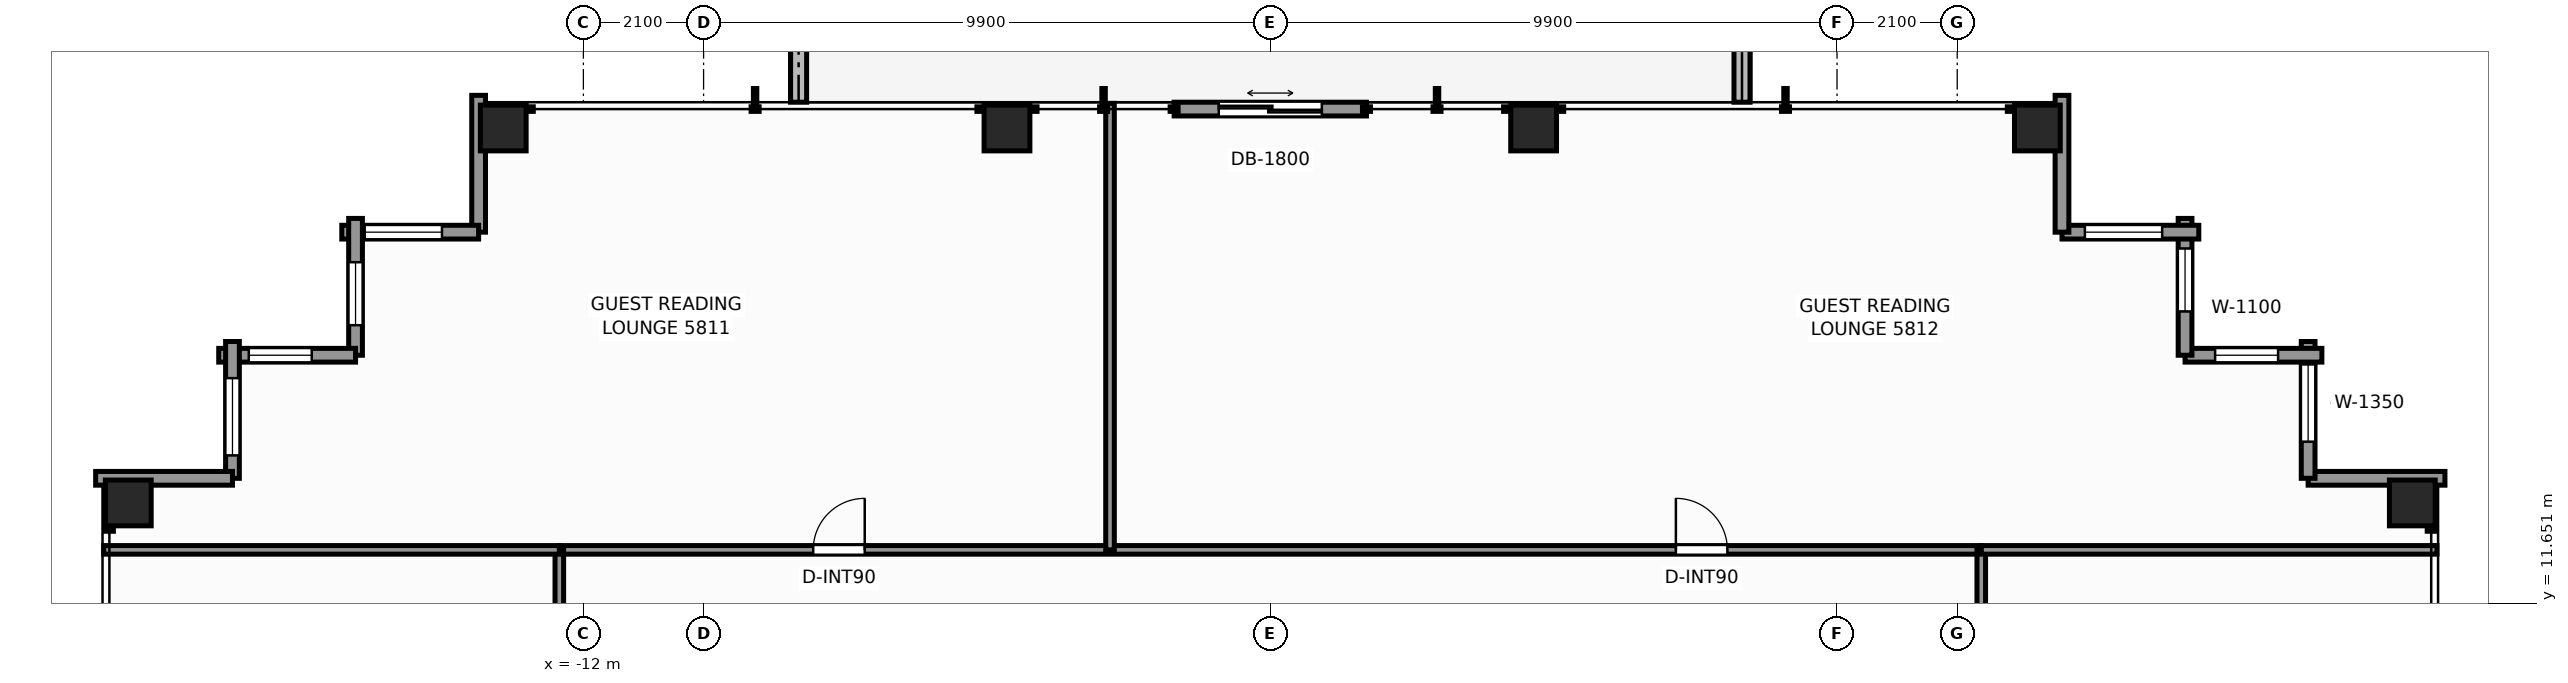
"""IFC4 building model, lengths in metres.
Left out: names, types, materials, properties, quantities, classifications, styles, units other than length and angle.
Written with IfcOpenShell. Run it as: python <this file> out.ifc"""

import sys

from ifc_helpers import new_model, si_unit, direction, frame, frame_2d, origin, origin_2d, place, context, subcontext, project, spatial, rectangle, extrude, element, fill, save


model = new_model("IFC4")
c1 = context("Model", 3, precision=1e-05, world=origin(), true_north=direction((0.0, 1.0)))
c2 = subcontext(c1, "Body", "Model", "MODEL_VIEW")
j1 = project(units=[si_unit("LENGTHUNIT", "METRE"), si_unit("PLANEANGLEUNIT", "RADIAN")], contexts=[c1])
p1 = place(None, origin())
s1 = spatial("IfcSite", under=j1, at=p1, CompositionType="ELEMENT")
p2 = place(p1, origin())
s2 = spatial("IfcBuilding", under=s1, at=p2, CompositionType="ELEMENT")
p3 = place(p2, frame((0.0, 0.0, 199.8)))
s3 = spatial("IfcBuildingStorey", under=s2, at=p3, CompositionType="ELEMENT", Elevation=199.8)
for number, where, z_axis, x_axis in (
    (1, (-13.4, 19.95, 0.0), (0.0, 0.0, 1.0), (1.0, 0.0, 0.0)),
    (2, (-4.6, 19.95, 0.0), (0.0, 0.0, 1.0), (1.0, 0.0, 0.0)),
    (3, (4.6, 19.95, 0.0), (0.0, 0.0, 1.0), (1.0, 0.0, 0.0)),
    (4, (13.4, 19.95, 0.0), (0.0, 0.0, 1.0), (1.0, 0.0, 0.0)),
    (5, (-19.95, 13.4, 0.0), (0.0, 0.0, 1.0), (1.0, 0.0, 0.0)),
    (6, (19.95, 13.4, 0.0), (0.0, 0.0, 1.0), (1.0, 0.0, 0.0)),
):
    element("IfcColumn", number, at=place(p3, frame(where, z_axis=z_axis, x_axis=x_axis)), inside=s3, PredefinedType="COLUMN", context=c2, shape_type="SweptSolid", body=[
        extrude(rectangle(XDim=0.8, YDim=0.8, at=origin_2d()), origin(), (0.0, 0.0, 1.0), 3.3),
    ])
p4 = place(p3, frame((8.24, 20.4, -0.04), z_axis=(0.0, 0.0, 1.0), x_axis=(0.0, 1.0, 0.0)))
e7 = element("IfcWall", 7, at=p4, inside=s3, PredefinedType="PARAPET", context=c2, shape_type="SweptSolid", body=[
    extrude(rectangle(XDim=2.34, YDim=0.28, at=frame_2d((1.17, 0.0))), origin(), (0.0, 0.0, 1.0), 0.42),
])
p5 = place(p3, frame((-8.24, 23.767, -0.04), z_axis=(0.0, 0.0, 1.0), x_axis=(0.0, -1.0, 0.0)))
e8 = element("IfcWall", 8, at=p5, inside=s3, PredefinedType="PARAPET", context=c2, shape_type="SweptSolid", body=[
    extrude(rectangle(XDim=3.367, YDim=0.28, at=frame_2d((1.684, 0.0))), origin(), (0.0, 0.0, 1.0), 0.42),
])
p6 = place(p3, frame((18.13, 13.83, 0.0), z_axis=(0.0, 0.0, 1.0), x_axis=(1.0, 0.0, 0.0)))
e9 = element("IfcWall", 9, at=p6, inside=s3, PredefinedType="STANDARD", context=c2, shape_type="SweptSolid", body=[
    extrude(rectangle(XDim=2.39, YDim=0.24, at=frame_2d((1.195, 0.0))), origin(), (0.0, 0.0, 1.0), 2.463),
])
p7 = place(p3, frame((18.13, 16.22, 0.0), z_axis=(0.0, 0.0, 1.0), x_axis=(0.0, -1.0, 0.0)))
e10 = element("IfcWall", 10, at=p7, inside=s3, PredefinedType="STANDARD", context=c2, shape_type="SweptSolid", body=[
    extrude(rectangle(XDim=2.39, YDim=0.24, at=frame_2d((1.195, 0.0))), origin(), (0.0, 0.0, 1.0), 2.463),
])
p8 = place(p7, frame((0.4, 0.0, 0.65)))
e11 = element("IfcOpeningElement", 11, at=p8, cuts=e10, PredefinedType="OPENING", context=c2, shape_type="SweptSolid", body=[
    extrude(rectangle(XDim=1.35, YDim=1.55, at=frame_2d((0.675, 0.775))), frame((0.0, 0.13, 0.0), z_axis=(0.0, -1.0, 0.0), x_axis=(1.0, 0.0, 0.0)), (0.0, 0.0, 1.0), 0.26),
])
p9 = place(p3, frame((15.98, 15.98, 0.0), z_axis=(0.0, 0.0, 1.0), x_axis=(1.0, 0.0, 0.0)))
e12 = element("IfcWall", 12, at=p9, inside=s3, PredefinedType="STANDARD", context=c2, shape_type="SweptSolid", body=[
    extrude(rectangle(XDim=2.39, YDim=0.24, at=frame_2d((1.195, 0.0))), origin(), (0.0, 0.0, 1.0), 2.463),
])
p10 = place(p9, frame((0.525, 0.0, 0.65)))
e13 = element("IfcOpeningElement", 13, at=p10, cuts=e12, PredefinedType="OPENING", context=c2, shape_type="SweptSolid", body=[
    extrude(rectangle(XDim=1.1, YDim=1.45, at=frame_2d((0.55, 0.725))), frame((0.0, 0.13, 0.0), z_axis=(0.0, -1.0, 0.0), x_axis=(1.0, 0.0, 0.0)), (0.0, 0.0, 1.0), 0.26),
])
p11 = place(p3, frame((15.98, 18.37, 0.0), z_axis=(0.0, 0.0, 1.0), x_axis=(0.0, -1.0, 0.0)))
e14 = element("IfcWall", 14, at=p11, inside=s3, PredefinedType="STANDARD", context=c2, shape_type="SweptSolid", body=[
    extrude(rectangle(XDim=2.39, YDim=0.24, at=frame_2d((1.195, 0.0))), origin(), (0.0, 0.0, 1.0), 2.463),
])
p12 = place(p11, frame((0.525, 0.0, 0.65)))
e15 = element("IfcOpeningElement", 15, at=p12, cuts=e14, PredefinedType="OPENING", context=c2, shape_type="SweptSolid", body=[
    extrude(rectangle(XDim=1.1, YDim=1.45, at=frame_2d((0.55, 0.725))), frame((0.0, 0.13, 0.0), z_axis=(0.0, -1.0, 0.0), x_axis=(1.0, 0.0, 0.0)), (0.0, 0.0, 1.0), 0.26),
])
p13 = place(p3, frame((13.83, 18.13, 0.0), z_axis=(0.0, 0.0, 1.0), x_axis=(1.0, 0.0, 0.0)))
e16 = element("IfcWall", 16, at=p13, inside=s3, PredefinedType="STANDARD", context=c2, shape_type="SweptSolid", body=[
    extrude(rectangle(XDim=2.39, YDim=0.24, at=frame_2d((1.195, 0.0))), origin(), (0.0, 0.0, 1.0), 2.463),
])
p14 = place(p13, frame((0.4, 0.0, 0.65)))
e17 = element("IfcOpeningElement", 17, at=p14, cuts=e16, PredefinedType="OPENING", context=c2, shape_type="SweptSolid", body=[
    extrude(rectangle(XDim=1.35, YDim=1.55, at=frame_2d((0.675, 0.775))), frame((0.0, 0.13, 0.0), z_axis=(0.0, -1.0, 0.0), x_axis=(1.0, 0.0, 0.0)), (0.0, 0.0, 1.0), 0.26),
])
p15 = place(p3, frame((13.83, 20.52, 0.0), z_axis=(0.0, 0.0, 1.0), x_axis=(0.0, -1.0, 0.0)))
e18 = element("IfcWall", 18, at=p15, inside=s3, PredefinedType="STANDARD", context=c2, shape_type="SweptSolid", body=[
    extrude(rectangle(XDim=2.39, YDim=0.24, at=frame_2d((1.195, 0.0))), origin(), (0.0, 0.0, 1.0), 2.463),
])
p16 = place(p3, frame((-1.68, 20.28, 0.0), z_axis=(0.0, 0.0, 1.0), x_axis=(1.0, 0.0, 0.0)))
e19 = element("IfcWall", 19, at=p16, inside=s3, PredefinedType="STANDARD", context=c2, shape_type="SweptSolid", body=[
    extrude(rectangle(XDim=3.36, YDim=0.24, at=frame_2d((1.68, 0.0))), origin(), (0.0, 0.0, 1.0), 3.08),
])
p17 = place(p16, frame((0.78, 0.0, 0.0)))
e20 = element("IfcOpeningElement", 20, at=p17, cuts=e19, PredefinedType="OPENING", context=c2, shape_type="SweptSolid", body=[
    extrude(rectangle(XDim=1.8, YDim=2.2, at=frame_2d((0.9, 1.1))), frame((0.0, 0.13, 0.0), z_axis=(0.0, -1.0, 0.0), x_axis=(1.0, 0.0, 0.0)), (0.0, 0.0, 1.0), 0.26),
])
p18 = place(p3, frame((-13.83, 18.13, 0.0), z_axis=(0.0, 0.0, 1.0), x_axis=(0.0, 1.0, 0.0)))
e21 = element("IfcWall", 21, at=p18, inside=s3, PredefinedType="STANDARD", context=c2, shape_type="SweptSolid", body=[
    extrude(rectangle(XDim=2.39, YDim=0.24, at=frame_2d((1.195, 0.0))), origin(), (0.0, 0.0, 1.0), 2.463),
])
p19 = place(p3, frame((-16.22, 18.13, 0.0), z_axis=(0.0, 0.0, 1.0), x_axis=(1.0, 0.0, 0.0)))
e22 = element("IfcWall", 22, at=p19, inside=s3, PredefinedType="STANDARD", context=c2, shape_type="SweptSolid", body=[
    extrude(rectangle(XDim=2.39, YDim=0.24, at=frame_2d((1.195, 0.0))), origin(), (0.0, 0.0, 1.0), 2.463),
])
p20 = place(p19, frame((0.4, 0.0, 0.65)))
e23 = element("IfcOpeningElement", 23, at=p20, cuts=e22, PredefinedType="OPENING", context=c2, shape_type="SweptSolid", body=[
    extrude(rectangle(XDim=1.35, YDim=1.55, at=frame_2d((0.675, 0.775))), frame((0.0, 0.13, 0.0), z_axis=(0.0, -1.0, 0.0), x_axis=(1.0, 0.0, 0.0)), (0.0, 0.0, 1.0), 0.26),
])
p21 = place(p3, frame((-15.98, 15.98, 0.0), z_axis=(0.0, 0.0, 1.0), x_axis=(0.0, 1.0, 0.0)))
e24 = element("IfcWall", 24, at=p21, inside=s3, PredefinedType="STANDARD", context=c2, shape_type="SweptSolid", body=[
    extrude(rectangle(XDim=2.39, YDim=0.24, at=frame_2d((1.195, 0.0))), origin(), (0.0, 0.0, 1.0), 2.463),
])
p22 = place(p21, frame((0.525, 0.0, 0.65)))
e25 = element("IfcOpeningElement", 25, at=p22, cuts=e24, PredefinedType="OPENING", context=c2, shape_type="SweptSolid", body=[
    extrude(rectangle(XDim=1.1, YDim=1.45, at=frame_2d((0.55, 0.725))), frame((0.0, 0.13, 0.0), z_axis=(0.0, -1.0, 0.0), x_axis=(1.0, 0.0, 0.0)), (0.0, 0.0, 1.0), 0.26),
])
p23 = place(p3, frame((-18.37, 15.98, 0.0), z_axis=(0.0, 0.0, 1.0), x_axis=(1.0, 0.0, 0.0)))
e26 = element("IfcWall", 26, at=p23, inside=s3, PredefinedType="STANDARD", context=c2, shape_type="SweptSolid", body=[
    extrude(rectangle(XDim=2.39, YDim=0.24, at=frame_2d((1.195, 0.0))), origin(), (0.0, 0.0, 1.0), 2.463),
])
p24 = place(p23, frame((0.525, 0.0, 0.65)))
e27 = element("IfcOpeningElement", 27, at=p24, cuts=e26, PredefinedType="OPENING", context=c2, shape_type="SweptSolid", body=[
    extrude(rectangle(XDim=1.1, YDim=1.45, at=frame_2d((0.55, 0.725))), frame((0.0, 0.13, 0.0), z_axis=(0.0, -1.0, 0.0), x_axis=(1.0, 0.0, 0.0)), (0.0, 0.0, 1.0), 0.26),
])
p25 = place(p3, frame((-18.13, 13.83, 0.0), z_axis=(0.0, 0.0, 1.0), x_axis=(0.0, 1.0, 0.0)))
e28 = element("IfcWall", 28, at=p25, inside=s3, PredefinedType="STANDARD", context=c2, shape_type="SweptSolid", body=[
    extrude(rectangle(XDim=2.39, YDim=0.24, at=frame_2d((1.195, 0.0))), origin(), (0.0, 0.0, 1.0), 2.463),
])
p26 = place(p25, frame((0.4, 0.0, 0.65)))
e29 = element("IfcOpeningElement", 29, at=p26, cuts=e28, PredefinedType="OPENING", context=c2, shape_type="SweptSolid", body=[
    extrude(rectangle(XDim=1.35, YDim=1.55, at=frame_2d((0.675, 0.775))), frame((0.0, 0.13, 0.0), z_axis=(0.0, -1.0, 0.0), x_axis=(1.0, 0.0, 0.0)), (0.0, 0.0, 1.0), 0.26),
])
p27 = place(p3, frame((-20.52, 13.83, 0.0), z_axis=(0.0, 0.0, 1.0), x_axis=(1.0, 0.0, 0.0)))
e30 = element("IfcWall", 30, at=p27, inside=s3, PredefinedType="STANDARD", context=c2, shape_type="SweptSolid", body=[
    extrude(rectangle(XDim=2.39, YDim=0.24, at=frame_2d((1.195, 0.0))), origin(), (0.0, 0.0, 1.0), 2.463),
])
p28 = place(p3, frame((-12.42, 12.58, 0.0), z_axis=(0.0, 0.0, 1.0), x_axis=(1.0, 0.0, 0.0)))
e31 = element("IfcWall", 31, at=p28, inside=s3, PredefinedType="PARTITIONING", context=c2, shape_type="SweptSolid", body=[
    extrude(rectangle(XDim=24.84, YDim=0.15, at=frame_2d((12.42, 0.0))), origin(), (0.0, 0.0, 1.0), 2.369),
])
p29 = place(p28, frame((4.435, 0.0, 0.0)))
e32 = element("IfcOpeningElement", 32, at=p29, cuts=e31, PredefinedType="OPENING", context=c2, shape_type="SweptSolid", body=[
    extrude(rectangle(XDim=0.9, YDim=2.06, at=frame_2d((0.45, 1.03))), frame((0.0, 0.085, 0.0), z_axis=(0.0, -1.0, 0.0), x_axis=(1.0, 0.0, 0.0)), (0.0, 0.0, 1.0), 0.17),
])
p30 = place(p28, frame((19.505, 0.0, 0.0)))
e33 = element("IfcOpeningElement", 33, at=p30, cuts=e31, PredefinedType="OPENING", context=c2, shape_type="SweptSolid", body=[
    extrude(rectangle(XDim=0.9, YDim=2.06, at=frame_2d((0.45, 1.03))), frame((0.0, 0.085, 0.0), z_axis=(0.0, -1.0, 0.0), x_axis=(1.0, 0.0, 0.0)), (0.0, 0.0, 1.0), 0.17),
])
p31 = place(p3, frame((-12.42, -12.26, 0.0), z_axis=(0.0, 0.0, 1.0), x_axis=(0.0, 1.0, 0.0)))
e34 = element("IfcWall", 34, at=p31, inside=s3, PredefinedType="PARTITIONING", context=c2, shape_type="SweptSolid", body=[
    extrude(rectangle(XDim=24.84, YDim=0.15, at=frame_2d((12.42, 0.0))), origin(), (0.0, 0.0, 1.0), 2.369),
])
p32 = place(p31, frame((3.573, 0.0, 0.0)))
e35 = element("IfcOpeningElement", 35, at=p32, cuts=e34, PredefinedType="OPENING", context=c2, shape_type="SweptSolid", body=[
    extrude(rectangle(XDim=0.95, YDim=2.06, at=frame_2d((0.475, 1.03))), frame((0.0, 0.085, 0.0), z_axis=(0.0, -1.0, 0.0), x_axis=(1.0, 0.0, 0.0)), (0.0, 0.0, 1.0), 0.17),
])
p33 = place(p31, frame((9.755, 0.0, 0.0)))
e36 = element("IfcOpeningElement", 36, at=p33, cuts=e34, PredefinedType="OPENING", context=c2, shape_type="SweptSolid", body=[
    extrude(rectangle(XDim=0.95, YDim=2.06, at=frame_2d((0.475, 1.03))), frame((0.0, 0.085, 0.0), z_axis=(0.0, -1.0, 0.0), x_axis=(1.0, 0.0, 0.0)), (0.0, 0.0, 1.0), 0.17),
])
p34 = place(p31, frame((19.32, 0.0, 0.0)))
e37 = element("IfcOpeningElement", 37, at=p34, cuts=e34, PredefinedType="OPENING", context=c2, shape_type="SweptSolid", body=[
    extrude(rectangle(XDim=0.95, YDim=2.06, at=frame_2d((0.475, 1.03))), frame((0.0, 0.085, 0.0), z_axis=(0.0, -1.0, 0.0), x_axis=(1.0, 0.0, 0.0)), (0.0, 0.0, 1.0), 0.17),
])
p35 = place(p3, frame((12.42, -12.26, 0.0), z_axis=(0.0, 0.0, 1.0), x_axis=(0.0, 1.0, 0.0)))
e38 = element("IfcWall", 38, at=p35, inside=s3, PredefinedType="PARTITIONING", context=c2, shape_type="SweptSolid", body=[
    extrude(rectangle(XDim=24.84, YDim=0.15, at=frame_2d((12.42, 0.0))), origin(), (0.0, 0.0, 1.0), 2.369),
])
p36 = place(p35, frame((2.944, 0.0, 0.0)))
e39 = element("IfcOpeningElement", 39, at=p36, cuts=e38, PredefinedType="OPENING", context=c2, shape_type="SweptSolid", body=[
    extrude(rectangle(XDim=0.9, YDim=2.06, at=frame_2d((0.45, 1.03))), frame((0.0, 0.085, 0.0), z_axis=(0.0, -1.0, 0.0), x_axis=(1.0, 0.0, 0.0)), (0.0, 0.0, 1.0), 0.17),
])
p37 = place(p35, frame((5.279, 0.0, 0.0)))
e40 = element("IfcOpeningElement", 40, at=p37, cuts=e38, PredefinedType="OPENING", context=c2, shape_type="SweptSolid", body=[
    extrude(rectangle(XDim=0.9, YDim=2.06, at=frame_2d((0.45, 1.03))), frame((0.0, 0.085, 0.0), z_axis=(0.0, -1.0, 0.0), x_axis=(1.0, 0.0, 0.0)), (0.0, 0.0, 1.0), 0.17),
])
p38 = place(p35, frame((13.602, 0.0, 0.0)))
e41 = element("IfcOpeningElement", 41, at=p38, cuts=e38, PredefinedType="OPENING", context=c2, shape_type="SweptSolid", body=[
    extrude(rectangle(XDim=0.9, YDim=2.06, at=frame_2d((0.45, 1.03))), frame((0.0, 0.085, 0.0), z_axis=(0.0, -1.0, 0.0), x_axis=(1.0, 0.0, 0.0)), (0.0, 0.0, 1.0), 0.17),
])
p39 = place(p35, frame((19.098, 0.0, 0.0)))
e42 = element("IfcOpeningElement", 42, at=p39, cuts=e38, PredefinedType="OPENING", context=c2, shape_type="SweptSolid", body=[
    extrude(rectangle(XDim=0.95, YDim=2.06, at=frame_2d((0.475, 1.03))), frame((0.0, 0.085, 0.0), z_axis=(0.0, -1.0, 0.0), x_axis=(1.0, 0.0, 0.0)), (0.0, 0.0, 1.0), 0.17),
])
p40 = place(p35, frame((20.836, 0.0, 0.0)))
e43 = element("IfcOpeningElement", 43, at=p40, cuts=e38, PredefinedType="OPENING", context=c2, shape_type="SweptSolid", body=[
    extrude(rectangle(XDim=0.9, YDim=2.06, at=frame_2d((0.45, 1.03))), frame((0.0, 0.085, 0.0), z_axis=(0.0, -1.0, 0.0), x_axis=(1.0, 0.0, 0.0)), (0.0, 0.0, 1.0), 0.17),
])
for number, where, z_axis, x_axis in (
    (44, (-20.38, 12.58, 0.0), (0.0, 0.0, 1.0), (1.0, 0.0, 0.0)),
    (45, (12.42, 12.58, 0.0), (0.0, 0.0, 1.0), (1.0, 0.0, 0.0)),
):
    element("IfcWall", number, at=place(p3, frame(where, z_axis=z_axis, x_axis=x_axis)), inside=s3, PredefinedType="PARTITIONING", context=c2, shape_type="SweptSolid", body=[
        extrude(rectangle(XDim=7.96, YDim=0.15, at=frame_2d((3.98, 0.0))), origin(), (0.0, 0.0, 1.0), 2.369),
    ])
p41 = place(p3, frame((-2.8, 12.58, 0.0), z_axis=(0.0, 0.0, 1.0), x_axis=(0.0, 1.0, 0.0)))
e46 = element("IfcWall", 46, at=p41, inside=s3, PredefinedType="PARTITIONING", context=c2, shape_type="SweptSolid", body=[
    extrude(rectangle(XDim=7.8, YDim=0.15, at=frame_2d((3.9, 0.0))), origin(), (0.0, 0.0, 1.0), 2.453),
])
p42 = place(p8, origin())
e47 = element("IfcWindow", 47, at=p42, inside=s3, PartitioningType="SINGLE_PANEL", PredefinedType="WINDOW", context=c2, shape_type="SweptSolid", body=[
    extrude(rectangle(XDim=1.35, YDim=1.55, at=frame_2d((0.675, 0.775))), frame((0.0, 0.03, 0.0), z_axis=(0.0, -1.0, 0.0), x_axis=(1.0, 0.0, 0.0)), (0.0, 0.0, 1.0), 0.06),
])
fill(e11, e47)
p43 = place(p10, origin())
e48 = element("IfcWindow", 48, at=p43, inside=s3, PartitioningType="SINGLE_PANEL", PredefinedType="WINDOW", context=c2, shape_type="SweptSolid", body=[
    extrude(rectangle(XDim=1.1, YDim=1.45, at=frame_2d((0.55, 0.725))), frame((0.0, 0.03, 0.0), z_axis=(0.0, -1.0, 0.0), x_axis=(1.0, 0.0, 0.0)), (0.0, 0.0, 1.0), 0.06),
])
fill(e13, e48)
p44 = place(p12, origin())
e49 = element("IfcWindow", 49, at=p44, inside=s3, PartitioningType="SINGLE_PANEL", PredefinedType="WINDOW", context=c2, shape_type="SweptSolid", body=[
    extrude(rectangle(XDim=1.1, YDim=1.45, at=frame_2d((0.55, 0.725))), frame((0.0, 0.03, 0.0), z_axis=(0.0, -1.0, 0.0), x_axis=(1.0, 0.0, 0.0)), (0.0, 0.0, 1.0), 0.06),
])
fill(e15, e49)
p45 = place(p14, origin())
e50 = element("IfcWindow", 50, at=p45, inside=s3, PartitioningType="SINGLE_PANEL", PredefinedType="WINDOW", context=c2, shape_type="SweptSolid", body=[
    extrude(rectangle(XDim=1.35, YDim=1.55, at=frame_2d((0.675, 0.775))), frame((0.0, 0.03, 0.0), z_axis=(0.0, -1.0, 0.0), x_axis=(1.0, 0.0, 0.0)), (0.0, 0.0, 1.0), 0.06),
])
fill(e17, e50)
p46 = place(p17, origin())
e51 = element("IfcDoor", 51, at=p46, inside=s3, OperationType="DOUBLE_DOOR_SLIDING", PredefinedType="DOOR", context=c2, shape_type="SweptSolid", body=[
    extrude(rectangle(XDim=1.8, YDim=2.2, at=frame_2d((0.9, 1.1))), frame((0.0, 0.025, 0.0), z_axis=(0.0, -1.0, 0.0), x_axis=(1.0, 0.0, 0.0)), (0.0, 0.0, 1.0), 0.05),
])
fill(e20, e51)
p47 = place(p20, origin())
e52 = element("IfcWindow", 52, at=p47, inside=s3, PartitioningType="SINGLE_PANEL", PredefinedType="WINDOW", context=c2, shape_type="SweptSolid", body=[
    extrude(rectangle(XDim=1.35, YDim=1.55, at=frame_2d((0.675, 0.775))), frame((0.0, 0.03, 0.0), z_axis=(0.0, -1.0, 0.0), x_axis=(1.0, 0.0, 0.0)), (0.0, 0.0, 1.0), 0.06),
])
fill(e23, e52)
p48 = place(p22, origin())
e53 = element("IfcWindow", 53, at=p48, inside=s3, PartitioningType="SINGLE_PANEL", PredefinedType="WINDOW", context=c2, shape_type="SweptSolid", body=[
    extrude(rectangle(XDim=1.1, YDim=1.45, at=frame_2d((0.55, 0.725))), frame((0.0, 0.03, 0.0), z_axis=(0.0, -1.0, 0.0), x_axis=(1.0, 0.0, 0.0)), (0.0, 0.0, 1.0), 0.06),
])
fill(e25, e53)
p49 = place(p24, origin())
e54 = element("IfcWindow", 54, at=p49, inside=s3, PartitioningType="SINGLE_PANEL", PredefinedType="WINDOW", context=c2, shape_type="SweptSolid", body=[
    extrude(rectangle(XDim=1.1, YDim=1.45, at=frame_2d((0.55, 0.725))), frame((0.0, 0.03, 0.0), z_axis=(0.0, -1.0, 0.0), x_axis=(1.0, 0.0, 0.0)), (0.0, 0.0, 1.0), 0.06),
])
fill(e27, e54)
p50 = place(p26, origin())
e55 = element("IfcWindow", 55, at=p50, inside=s3, PartitioningType="SINGLE_PANEL", PredefinedType="WINDOW", context=c2, shape_type="SweptSolid", body=[
    extrude(rectangle(XDim=1.35, YDim=1.55, at=frame_2d((0.675, 0.775))), frame((0.0, 0.03, 0.0), z_axis=(0.0, -1.0, 0.0), x_axis=(1.0, 0.0, 0.0)), (0.0, 0.0, 1.0), 0.06),
])
fill(e29, e55)
p51 = place(p29, origin())
e56 = element("IfcDoor", 56, at=p51, inside=s3, OperationType="SINGLE_SWING_RIGHT", PredefinedType="DOOR", context=c2, shape_type="SweptSolid", body=[
    extrude(rectangle(XDim=0.9, YDim=2.06, at=frame_2d((0.45, 1.03))), frame((0.0, 0.025, 0.0), z_axis=(0.0, -1.0, 0.0), x_axis=(1.0, 0.0, 0.0)), (0.0, 0.0, 1.0), 0.05),
])
fill(e32, e56)
p52 = place(p30, origin())
e57 = element("IfcDoor", 57, at=p52, inside=s3, OperationType="SINGLE_SWING_LEFT", PredefinedType="DOOR", context=c2, shape_type="SweptSolid", body=[
    extrude(rectangle(XDim=0.9, YDim=2.06, at=frame_2d((0.45, 1.03))), frame((0.0, 0.025, 0.0), z_axis=(0.0, -1.0, 0.0), x_axis=(1.0, 0.0, 0.0)), (0.0, 0.0, 1.0), 0.05),
])
fill(e33, e57)
save(model, sys.argv[1])
